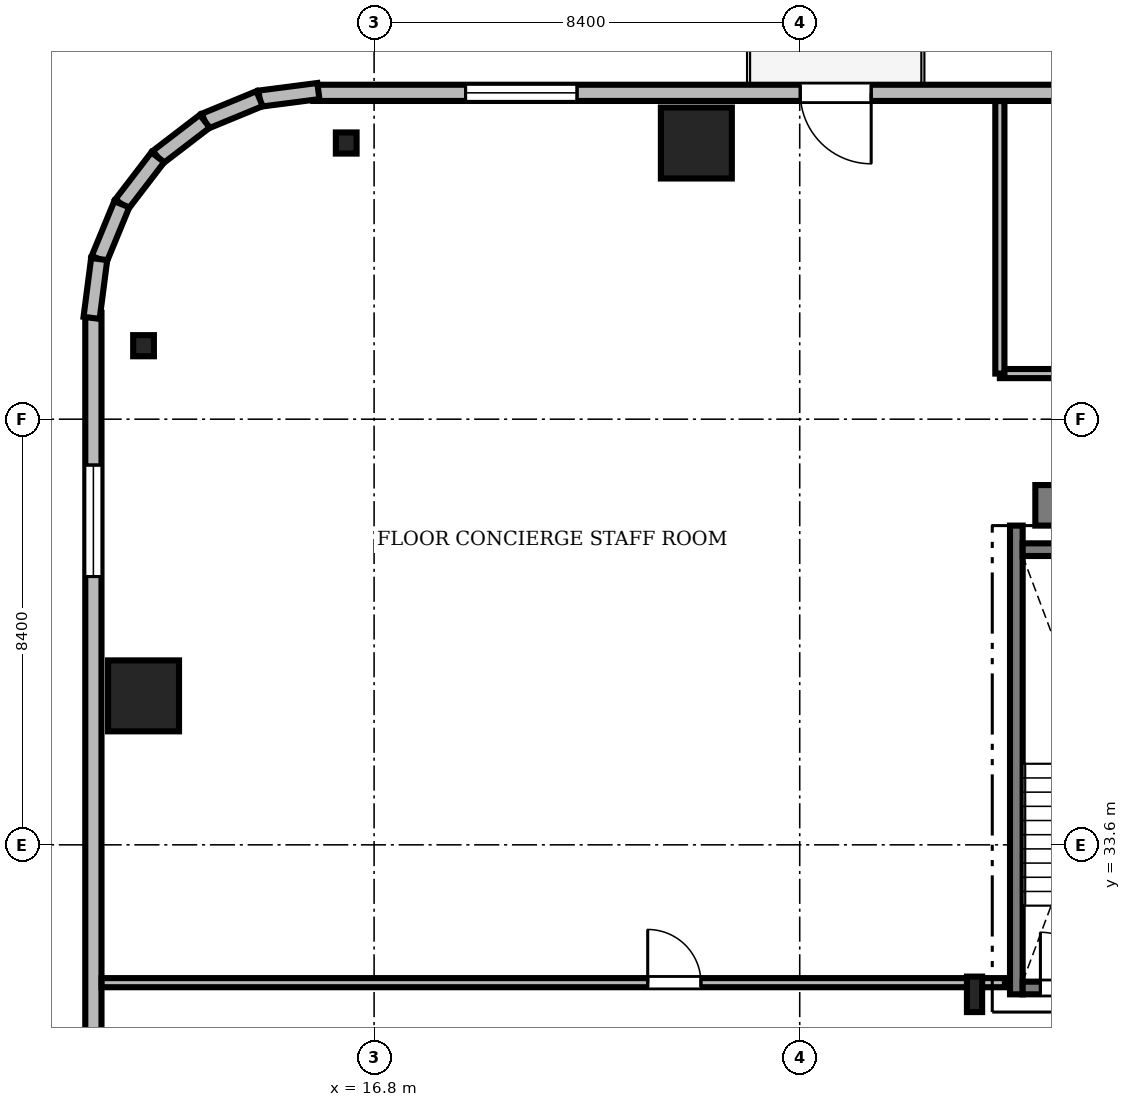
"""IFC4 building model, lengths in metres.
Left out: names, types, materials, properties, quantities, classifications, styles, units other than length and angle.
Written with IfcOpenShell. Run it as: python <this file> out.ifc"""

import sys

from ifc_helpers import new_model, si_unit, direction, frame, frame_2d, origin, origin_2d, place, context, subcontext, project, spatial, rectangle, i_section, extrude, source, transform, mapped, element, fill, save


model = new_model("IFC4")
c1 = context("Model", 3, precision=1e-05, world=origin(), true_north=direction((0.0, 1.0)))
c2 = subcontext(c1, "Body", "Model", "MODEL_VIEW")
j1 = project(units=[si_unit("LENGTHUNIT", "METRE"), si_unit("PLANEANGLEUNIT", "RADIAN")], contexts=[c1])
p1 = place(None, origin())
s1 = spatial("IfcSite", under=j1, at=p1, CompositionType="ELEMENT")
p2 = place(p1, origin())
s2 = spatial("IfcBuilding", under=s1, at=p2, CompositionType="ELEMENT")
p3 = place(p2, frame((0.0, 0.0, 207.3)))
s3 = spatial("IfcBuildingStorey", under=s2, at=p3, CompositionType="ELEMENT", Elevation=207.3)
m1 = source(origin(), c2, "Body", "SweptSolid", [
    extrude(rectangle(XDim=17.52, YDim=0.8, at=frame_2d((8.76, 0.0))), origin(), (0.0, 0.0, 1.0), 3.53),
])
p4 = place(p3, frame((29.85, 40.3, 0.0), z_axis=(0.0, 0.0, 1.0), x_axis=(1.0, 0.0, 0.0)))
e1 = element("IfcWall", 1, at=p4, inside=s3, PredefinedType="SHEAR", context=c2, shape_type="MappedRepresentation", body=[
    mapped(m1, transform((0.0, 0.0, 0.0), scale=1.0)),
])
m2 = source(origin(), c2, "Body", "SweptSolid", [
    extrude(i_section(OverallWidth=0.3, OverallDepth=0.7, WebThickness=0.017, FlangeThickness=0.032, FilletRadius=0.027, at=origin_2d()), origin(), (0.0, 0.0, 1.0), 3.53),
])
p5 = place(p3, frame((28.65, 30.65, 0.0), z_axis=(0.0, 0.0, 1.0), x_axis=(1.0, 0.0, 0.0)))
e2 = element("IfcColumn", 2, at=p5, inside=s3, PredefinedType="COLUMN", context=c2, shape_type="MappedRepresentation", body=[
    mapped(m2, transform((0.0, 0.0, 0.0), scale=1.0)),
])
m3 = source(origin(), c2, "Body", "SweptSolid", [
    extrude(rectangle(XDim=1.4, YDim=1.4, at=origin_2d()), origin(), (0.0, 0.0, 1.0), 3.53),
])
for number, where, z_axis, x_axis in (
    (3, (23.16, 47.45, 0.0), (0.0, 0.0, 1.0), (1.0, 0.0, 0.0)),
    (4, (12.25, 36.54, 0.0), (0.0, 0.0, 1.0), (1.0, 0.0, 0.0)),
):
    element("IfcColumn", number, at=place(p3, frame(where, z_axis=z_axis, x_axis=x_axis)), inside=s3, PredefinedType="COLUMN", context=c2, shape_type="MappedRepresentation", body=[
        mapped(m3, transform((0.0, 0.0, 0.0), scale=1.0)),
    ])
m4 = source(origin(), c2, "Body", "SweptSolid", [
    extrude(i_section(OverallWidth=0.409, OverallDepth=0.417, WebThickness=0.021, FlangeThickness=0.033, FilletRadius=0.015, at=origin_2d()), origin(), (0.0, 0.0, 1.0), 3.53),
])
for number, where, z_axis, x_axis in (
    (5, (16.25, 47.45, 0.0), (0.0, 0.0, 1.0), (1.0, 0.0, 0.0)),
    (6, (12.25, 43.45, 0.0), (0.0, 0.0, 1.0), (1.0, 0.0, 0.0)),
):
    element("IfcColumn", number, at=place(p3, frame(where, z_axis=z_axis, x_axis=x_axis)), inside=s3, PredefinedType="COLUMN", context=c2, shape_type="MappedRepresentation", body=[
        mapped(m4, transform((0.0, 0.0, 0.0), scale=1.0)),
    ])
m5 = source(origin(), c2, "Body", "SweptSolid", [
    extrude(rectangle(XDim=15.6, YDim=0.32, at=frame_2d((7.8, 0.0))), origin(), (0.0, 0.0, 1.0), 3.53),
])
p6 = place(p3, frame((31.2, 48.44, 0.0), z_axis=(0.0, 0.0, 1.0), x_axis=(-1.0, 0.0, 0.0)))
e7 = element("IfcWall", 7, at=p6, inside=s3, PredefinedType="SOLIDWALL", context=c2, shape_type="MappedRepresentation", body=[
    mapped(m5, transform((0.0, 0.0, 0.0), scale=1.0)),
])
m6 = source(origin(), c2, "Body", "SweptSolid", [
    extrude(rectangle(XDim=1.4, YDim=2.3, at=frame_2d((0.7, 1.15))), frame((0.0, 0.17, 0.0), z_axis=(0.0, -1.0, 0.0), x_axis=(1.0, 0.0, 0.0)), (0.0, 0.0, 1.0), 0.34),
])
p7 = place(p6, frame((4.59, 0.0, 0.0)))
e8 = element("IfcOpeningElement", 8, at=p7, cuts=e7, PredefinedType="OPENING", context=c2, shape_type="MappedRepresentation", body=[
    mapped(m6, transform((0.0, 0.0, 0.0), scale=1.0)),
])
m7 = source(origin(), c2, "Body", "SweptSolid", [
    extrude(rectangle(XDim=2.2, YDim=2.4, at=frame_2d((1.1, 1.2))), frame((0.0, 0.17, 0.0), z_axis=(0.0, -1.0, 0.0), x_axis=(1.0, 0.0, 0.0)), (0.0, 0.0, 1.0), 0.34),
])
p8 = place(p6, frame((10.395, 0.0, 0.72)))
e9 = element("IfcOpeningElement", 9, at=p8, cuts=e7, PredefinedType="OPENING", context=c2, shape_type="MappedRepresentation", body=[
    mapped(m7, transform((0.0, 0.0, 0.0), scale=1.0)),
])
m8 = source(origin(), c2, "Body", "SweptSolid", [
    extrude(rectangle(XDim=15.6, YDim=0.32, at=frame_2d((7.8, 0.0))), origin(), (0.0, 0.0, 1.0), 3.53),
])
p9 = place(p3, frame((11.26, 44.1, 0.0), z_axis=(0.0, 0.0, 1.0), x_axis=(0.0, -1.0, 0.0)))
e10 = element("IfcWall", 10, at=p9, inside=s3, PredefinedType="SOLIDWALL", context=c2, shape_type="MappedRepresentation", body=[
    mapped(m8, transform((0.0, 0.0, 0.0), scale=1.0)),
])
p10 = place(p9, frame((3.005, 0.0, 0.72)))
e11 = element("IfcOpeningElement", 11, at=p10, cuts=e10, PredefinedType="OPENING", context=c2, shape_type="MappedRepresentation", body=[
    mapped(m7, transform((0.0, 0.0, 0.0), scale=1.0)),
])
m9 = source(origin(), c2, "Body", "SweptSolid", [
    extrude(rectangle(XDim=1.17, YDim=0.32, at=frame_2d((0.585, 0.0))), origin(), (0.0, 0.0, 1.0), 3.53),
])
p11 = place(p3, frame((15.7, 48.476, 0.0), z_axis=(0.0, 0.0, 1.0), x_axis=(-0.991735963317, -0.128295670475, 0.0)))
e12 = element("IfcWall", 12, at=p11, inside=s3, PredefinedType="SOLIDWALL", context=c2, shape_type="MappedRepresentation", body=[
    mapped(m9, transform((0.0, 0.0, 0.0), scale=1.0)),
])
m10 = source(origin(), c2, "Body", "SweptSolid", [
    extrude(rectangle(XDim=1.169, YDim=0.32, at=frame_2d((0.584, 0.0))), origin(), (0.0, 0.0, 1.0), 3.53),
])
p12 = place(p3, frame((14.54, 48.325, 0.0), z_axis=(0.0, 0.0, 1.0), x_axis=(-0.924552646638, -0.381054331552, 0.0)))
e13 = element("IfcWall", 13, at=p12, inside=s3, PredefinedType="SOLIDWALL", context=c2, shape_type="MappedRepresentation", body=[
    mapped(m10, transform((0.0, 0.0, 0.0), scale=1.0)),
])
m11 = source(origin(), c2, "Body", "SweptSolid", [
    extrude(rectangle(XDim=1.169, YDim=0.32, at=frame_2d((0.584, 0.0))), origin(), (0.0, 0.0, 1.0), 3.53),
])
p13 = place(p3, frame((13.459, 47.88, 0.0), z_axis=(0.0, 0.0, 1.0), x_axis=(-0.793663520347, -0.608356981114, 0.0)))
e14 = element("IfcWall", 14, at=p13, inside=s3, PredefinedType="SOLIDWALL", context=c2, shape_type="MappedRepresentation", body=[
    mapped(m11, transform((0.0, 0.0, 0.0), scale=1.0)),
])
m12 = source(origin(), c2, "Body", "SweptSolid", [
    extrude(rectangle(XDim=1.169, YDim=0.32, at=frame_2d((0.584, 0.0))), origin(), (0.0, 0.0, 1.0), 3.53),
])
p14 = place(p3, frame((12.531, 47.169, 0.0), z_axis=(0.0, 0.0, 1.0), x_axis=(-0.608387696831, -0.793639975269, 0.0)))
e15 = element("IfcWall", 15, at=p14, inside=s3, PredefinedType="SOLIDWALL", context=c2, shape_type="MappedRepresentation", body=[
    mapped(m12, transform((0.0, 0.0, 0.0), scale=1.0)),
])
p15 = place(p3, frame((11.82, 46.241, 0.0), z_axis=(0.0, 0.0, 1.0), x_axis=(-0.381054331552, -0.924552646638, 0.0)))
e16 = element("IfcWall", 16, at=p15, inside=s3, PredefinedType="SOLIDWALL", context=c2, shape_type="MappedRepresentation", body=[
    mapped(m10, transform((0.0, 0.0, 0.0), scale=1.0)),
])
p16 = place(p3, frame((11.375, 45.16, 0.0), z_axis=(0.0, 0.0, 1.0), x_axis=(-0.128295670475, -0.991735963317, 0.0)))
e17 = element("IfcWall", 17, at=p16, inside=s3, PredefinedType="SOLIDWALL", context=c2, shape_type="MappedRepresentation", body=[
    mapped(m9, transform((0.0, 0.0, 0.0), scale=1.0)),
])
m13 = source(origin(), c2, "Body", "SweptSolid", [
    extrude(rectangle(XDim=9.25, YDim=0.25, at=frame_2d((4.625, 0.0))), origin(), (0.0, 0.0, 1.0), 3.55),
])
p17 = place(p3, frame((29.475, 30.65, 0.0), z_axis=(0.0, 0.0, 1.0), x_axis=(0.0, 1.0, 0.0)))
e18 = element("IfcWall", 18, at=p17, inside=s3, PredefinedType="SOLIDWALL", context=c2, shape_type="MappedRepresentation", body=[
    mapped(m13, transform((0.0, 0.0, 0.0), scale=1.0)),
])
m14 = source(origin(), c2, "Body", "SweptSolid", [
    extrude(rectangle(XDim=3.15, YDim=0.25, at=frame_2d((1.575, 0.0))), origin(), (0.0, 0.0, 1.0), 3.55),
])
p18 = place(p3, frame((29.6, 39.425, 0.0), z_axis=(0.0, 0.0, 1.0), x_axis=(1.0, 0.0, 0.0)))
e19 = element("IfcWall", 19, at=p18, inside=s3, PredefinedType="SOLIDWALL", context=c2, shape_type="MappedRepresentation", body=[
    mapped(m14, transform((0.0, 0.0, 0.0), scale=1.0)),
])
p19 = place(p3, frame((29.6, 30.775, 0.0), z_axis=(0.0, 0.0, 1.0), x_axis=(1.0, 0.0, 0.0)))
e20 = element("IfcWall", 20, at=p19, inside=s3, PredefinedType="SOLIDWALL", context=c2, shape_type="MappedRepresentation", body=[
    mapped(m14, transform((0.0, 0.0, 0.0), scale=1.0)),
])
m15 = source(origin(), c2, "Body", "SweptSolid", [
    extrude(rectangle(XDim=1.1, YDim=2.2, at=frame_2d((0.55, 1.1))), frame((0.0, 0.135, 0.0), z_axis=(0.0, -1.0, 0.0), x_axis=(1.0, 0.0, 0.0)), (0.0, 0.0, 1.0), 0.27),
])
p20 = place(p19, frame((0.35, 0.0, 0.0)))
e21 = element("IfcOpeningElement", 21, at=p20, cuts=e20, PredefinedType="OPENING", context=c2, shape_type="MappedRepresentation", body=[
    mapped(m15, transform((0.0, 0.0, 0.0), scale=1.0)),
])
m16 = source(origin(), c2, "Body", "SweptSolid", [
    extrude(rectangle(XDim=28.428, YDim=0.18, at=frame_2d((14.214, 0.0))), origin(), (0.0, 0.0, 1.0), 2.772),
])
p21 = place(p3, frame((29.15, 42.9, 0.0), z_axis=(0.0, 0.0, 1.0), x_axis=(1.0, 0.0, 0.0)))
e22 = element("IfcWall", 22, at=p21, inside=s3, PredefinedType="PARTITIONING", context=c2, shape_type="MappedRepresentation", body=[
    mapped(m16, transform((0.0, 0.0, 0.0), scale=1.0)),
])
m17 = source(origin(), c2, "Body", "SweptSolid", [
    extrude(rectangle(XDim=1.05, YDim=2.2, at=frame_2d((0.525, 1.1))), frame((0.0, 0.1, 0.0), z_axis=(0.0, -1.0, 0.0), x_axis=(1.0, 0.0, 0.0)), (0.0, 0.0, 1.0), 0.2),
])
p22 = place(p21, frame((4.5, 0.0, 0.0)))
e23 = element("IfcOpeningElement", 23, at=p22, cuts=e22, PredefinedType="OPENING", context=c2, shape_type="MappedRepresentation", body=[
    mapped(m17, transform((0.0, 0.0, 0.0), scale=1.0)),
])
m18 = source(origin(), c2, "Body", "SweptSolid", [
    extrude(rectangle(XDim=17.828, YDim=0.18, at=frame_2d((8.914, 0.0))), origin(), (0.0, 0.0, 1.0), 2.772),
])
p23 = place(p3, frame((11.422, 30.88, 0.0), z_axis=(0.0, 0.0, 1.0), x_axis=(1.0, 0.0, 0.0)))
e24 = element("IfcWall", 24, at=p23, inside=s3, PredefinedType="PARTITIONING", context=c2, shape_type="MappedRepresentation", body=[
    mapped(m18, transform((0.0, 0.0, 0.0), scale=1.0)),
])
p24 = place(p23, frame((10.778, 0.0, 0.0)))
e25 = element("IfcOpeningElement", 25, at=p24, cuts=e24, PredefinedType="OPENING", context=c2, shape_type="MappedRepresentation", body=[
    mapped(m17, transform((0.0, 0.0, 0.0), scale=1.0)),
])
m19 = source(origin(), c2, "Body", "SweptSolid", [
    extrude(rectangle(XDim=5.378, YDim=0.18, at=frame_2d((2.689, 0.0))), origin(), (0.0, 0.0, 1.0), 2.772),
])
p25 = place(p3, frame((29.15, 42.9, 0.0), z_axis=(0.0, 0.0, 1.0), x_axis=(0.0, 1.0, 0.0)))
e26 = element("IfcWall", 26, at=p25, inside=s3, PredefinedType="PARTITIONING", context=c2, shape_type="MappedRepresentation", body=[
    mapped(m19, transform((0.0, 0.0, 0.0), scale=1.0)),
])
m20 = source(origin(), c2, "Body", "SweptSolid", [
    extrude(rectangle(XDim=1.4, YDim=2.3, at=frame_2d((0.7, 1.15))), frame((0.0, 0.025, 0.0), z_axis=(0.0, -1.0, 0.0), x_axis=(1.0, 0.0, 0.0)), (0.0, 0.0, 1.0), 0.05),
])
p26 = place(p7, frame((1.4, 0.0, 0.0), z_axis=(0.0, 0.0, 1.0), x_axis=(-1.0, 0.0, 0.0)))
e27 = element("IfcDoor", 27, at=p26, inside=s3, OperationType="DOUBLE_DOOR_SLIDING", PredefinedType="DOOR", context=c2, shape_type="MappedRepresentation", body=[
    mapped(m20, transform((0.0, 0.0, 0.0), scale=1.0)),
])
fill(e8, e27)
m21 = source(origin(), c2, "Body", "SweptSolid", [
    extrude(rectangle(XDim=2.2, YDim=2.4, at=frame_2d((1.1, 1.2))), frame((0.0, 0.03, 0.0), z_axis=(0.0, -1.0, 0.0), x_axis=(1.0, 0.0, 0.0)), (0.0, 0.0, 1.0), 0.06),
])
p27 = place(p8, origin())
e28 = element("IfcWindow", 28, at=p27, inside=s3, PartitioningType="SINGLE_PANEL", PredefinedType="WINDOW", context=c2, shape_type="MappedRepresentation", body=[
    mapped(m21, transform((0.0, 0.0, 0.0), scale=1.0)),
])
fill(e9, e28)
p28 = place(p10, origin())
e29 = element("IfcWindow", 29, at=p28, inside=s3, PartitioningType="SINGLE_PANEL", PredefinedType="WINDOW", context=c2, shape_type="MappedRepresentation", body=[
    mapped(m21, transform((0.0, 0.0, 0.0), scale=1.0)),
])
fill(e11, e29)
m22 = source(origin(), c2, "Body", "SweptSolid", [
    extrude(rectangle(XDim=1.1, YDim=2.2, at=frame_2d((0.55, 1.1))), frame((0.0, 0.025, 0.0), z_axis=(0.0, -1.0, 0.0), x_axis=(1.0, 0.0, 0.0)), (0.0, 0.0, 1.0), 0.05),
])
p29 = place(p20, origin())
e30 = element("IfcDoor", 30, at=p29, inside=s3, OperationType="SINGLE_SWING_LEFT", PredefinedType="DOOR", context=c2, shape_type="MappedRepresentation", body=[
    mapped(m22, transform((0.0, 0.0, 0.0), scale=1.0)),
])
fill(e21, e30)
m23 = source(origin(), c2, "Body", "SweptSolid", [
    extrude(rectangle(XDim=1.05, YDim=2.2, at=frame_2d((0.525, 1.1))), frame((0.0, 0.025, 0.0), z_axis=(0.0, -1.0, 0.0), x_axis=(1.0, 0.0, 0.0)), (0.0, 0.0, 1.0), 0.05),
])
p30 = place(p24, origin())
e31 = element("IfcDoor", 31, at=p30, inside=s3, OperationType="SINGLE_SWING_LEFT", PredefinedType="DOOR", context=c2, shape_type="MappedRepresentation", body=[
    mapped(m23, transform((0.0, 0.0, 0.0), scale=1.0)),
])
fill(e25, e31)
save(model, sys.argv[1])
